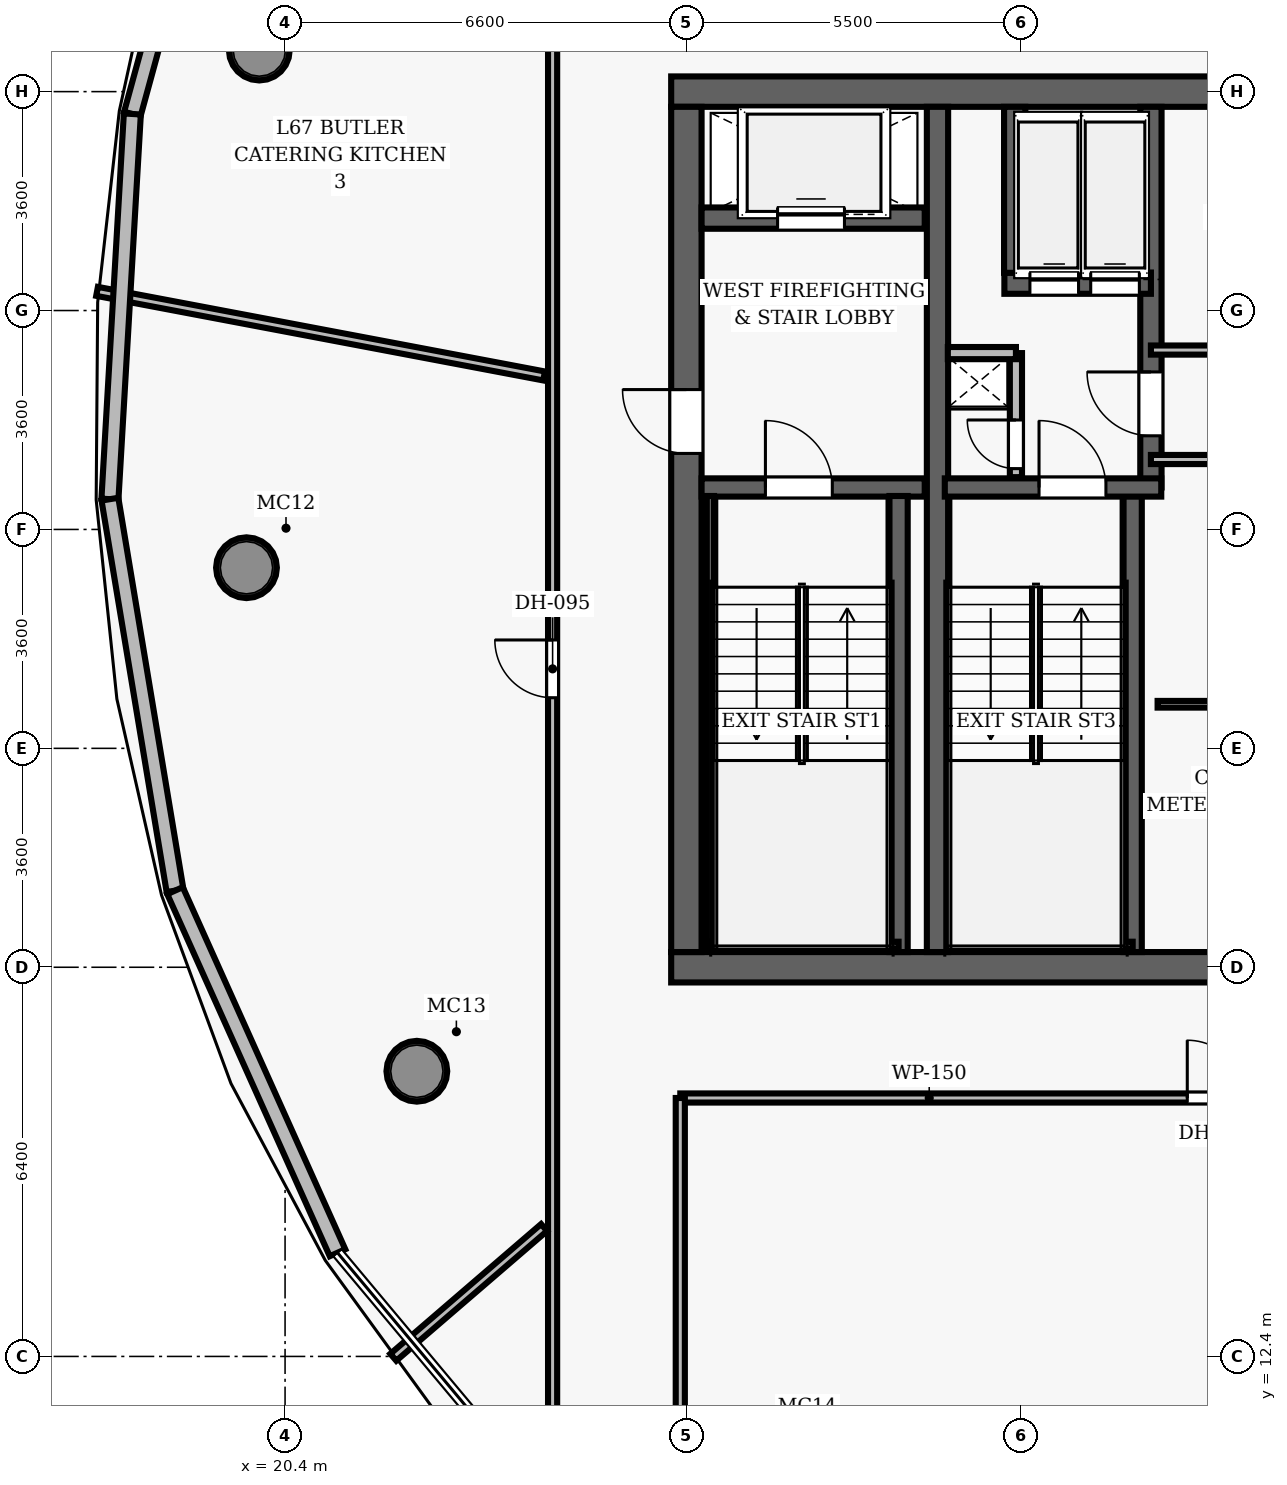
"""IFC4 building model, lengths in metres.
Left out: names, types, materials, properties, quantities, classifications, styles, units other than length and angle.
Written with IfcOpenShell. Run it as: python <this file> out.ifc"""

import sys

from ifc_helpers import new_model, si_unit, direction, frame, frame_2d, origin, origin_2d, place, context, subcontext, project, spatial, rectangle, hollow_circle, extrude, element, fill, save


model = new_model("IFC4")
c1 = context("Model", 3, precision=1e-05, world=origin(), true_north=direction((0.0, 1.0)))
c2 = subcontext(c1, "Body", "Model", "MODEL_VIEW")
j1 = project(units=[si_unit("LENGTHUNIT", "METRE"), si_unit("PLANEANGLEUNIT", "RADIAN")], contexts=[c1])
p1 = place(None, origin())
s1 = spatial("IfcSite", under=j1, at=p1, CompositionType="ELEMENT")
p2 = place(p1, origin())
s2 = spatial("IfcBuilding", under=s1, at=p2, CompositionType="ELEMENT")
p3 = place(p2, frame((0.0, 0.0, 265.15)))
s3 = spatial("IfcBuildingStorey", under=s2, at=p3, CompositionType="ELEMENT", Elevation=265.15)
p4 = place(p3, frame((26.75, 18.8, 0.0), z_axis=(0.0, 0.0, 1.0), x_axis=(1.0, 0.0, 0.0)))
e1 = element("IfcWall", 1, at=p4, inside=s3, PredefinedType="SHEAR", context=c2, shape_type="SweptSolid", body=[
    extrude(rectangle(XDim=22.5, YDim=0.5, at=frame_2d((11.25, 0.0))), origin(), (0.0, 0.0, 1.0), 3.85),
])
p5 = place(p4, frame((14.47, 0.0, 0.0)))
e2 = element("IfcOpeningElement", 2, at=p5, cuts=e1, PredefinedType="OPENING", context=c2, shape_type="SweptSolid", body=[
    extrude(rectangle(XDim=1.05, YDim=2.15, at=frame_2d((0.525, 1.075))), frame((0.0, 0.26, 0.0), z_axis=(0.0, -1.0, 0.0), x_axis=(1.0, 0.0, 0.0)), (0.0, 0.0, 1.0), 0.52),
])
p6 = place(p3, frame((26.75, 33.2, 0.0), z_axis=(0.0, 0.0, 1.0), x_axis=(1.0, 0.0, 0.0)))
e3 = element("IfcWall", 3, at=p6, inside=s3, PredefinedType="SHEAR", context=c2, shape_type="SweptSolid", body=[
    extrude(rectangle(XDim=22.5, YDim=0.5, at=frame_2d((11.25, 0.0))), origin(), (0.0, 0.0, 1.0), 3.85),
])
p7 = place(p3, frame((27.0, 19.05, 0.0), z_axis=(0.0, 0.0, 1.0), x_axis=(0.0, 1.0, 0.0)))
e4 = element("IfcWall", 4, at=p7, inside=s3, PredefinedType="SHEAR", context=c2, shape_type="SweptSolid", body=[
    extrude(rectangle(XDim=13.9, YDim=0.5, at=frame_2d((6.95, 0.0))), origin(), (0.0, 0.0, 1.0), 3.85),
])
p8 = place(p7, frame((8.2, 0.0, 0.0)))
e5 = element("IfcOpeningElement", 5, at=p8, cuts=e4, PredefinedType="OPENING", context=c2, shape_type="SweptSolid", body=[
    extrude(rectangle(XDim=1.05, YDim=2.15, at=frame_2d((0.525, 1.075))), frame((0.0, 0.26, 0.0), z_axis=(0.0, -1.0, 0.0), x_axis=(1.0, 0.0, 0.0)), (0.0, 0.0, 1.0), 0.52),
])
p9 = place(p3, frame((31.13, 19.05, 0.0), z_axis=(0.0, 0.0, 1.0), x_axis=(0.0, 1.0, 0.0)))
e6 = element("IfcWall", 6, at=p9, inside=s3, PredefinedType="SHEAR", context=c2, shape_type="SweptSolid", body=[
    extrude(rectangle(XDim=13.9, YDim=0.35, at=frame_2d((6.95, 0.0))), origin(), (0.0, 0.0, 1.0), 3.85),
])
for number, where, z_axis, x_axis in (
    (7, (19.976, 33.884, 0.0), (0.0, 0.0, 1.0), (1.0, 0.0, 0.0)),
    (8, (19.765, 25.371, 0.0), (0.0, 0.0, 1.0), (1.0, 0.0, 0.0)),
    (9, (22.567, 17.09, 0.0), (0.0, 0.0, 1.0), (1.0, 0.0, 0.0)),
):
    element("IfcColumn", number, at=place(p3, frame(where, z_axis=z_axis, x_axis=x_axis)), inside=s3, PredefinedType="COLUMN", context=c2, shape_type="SweptSolid", body=[
        extrude(hollow_circle(Radius=0.5, WallThickness=0.045, at=origin_2d()), origin(), (0.0, 0.0, 1.0), 3.85),
    ])
p10 = place(p3, frame((27.25, 26.69, 0.0), z_axis=(0.0, 0.0, 1.0), x_axis=(1.0, 0.0, 0.0)))
e10 = element("IfcWall", 10, at=p10, inside=s3, PredefinedType="SHEAR", context=c2, shape_type="SweptSolid", body=[
    extrude(rectangle(XDim=3.67, YDim=0.3, at=frame_2d((1.835, 0.0))), origin(), (0.0, 0.0, 1.0), 3.85),
])
p11 = place(p10, frame((1.05, 0.0, 0.0)))
e11 = element("IfcOpeningElement", 11, at=p11, cuts=e10, PredefinedType="OPENING", context=c2, shape_type="SweptSolid", body=[
    extrude(rectangle(XDim=1.1, YDim=2.15, at=frame_2d((0.55, 1.075))), frame((0.0, 0.16, 0.0), z_axis=(0.0, -1.0, 0.0), x_axis=(1.0, 0.0, 0.0)), (0.0, 0.0, 1.0), 0.32),
])
p12 = place(p3, frame((30.49, 19.05, 0.0), z_axis=(0.0, 0.0, 1.0), x_axis=(0.0, 1.0, 0.0)))
e12 = element("IfcWall", 12, at=p12, inside=s3, PredefinedType="SHEAR", context=c2, shape_type="SweptSolid", body=[
    extrude(rectangle(XDim=7.5, YDim=0.3, at=frame_2d((3.75, 0.0))), origin(), (0.0, 0.0, 1.0), 3.85),
])
p13 = place(p3, frame((27.395, 19.1, 0.0), z_axis=(0.0, 0.0, 1.0), x_axis=(0.0, 1.0, 0.0)))
e13 = element("IfcWall", 13, at=p13, inside=s3, PredefinedType="SHEAR", context=c2, shape_type="SweptSolid", body=[
    extrude(rectangle(XDim=7.45, YDim=0.12, at=frame_2d((3.725, 0.0))), origin(), (0.0, 0.0, 1.0), 3.85),
])
p14 = place(p3, frame((27.395, 19.16, 0.0), z_axis=(0.0, 0.0, 1.0), x_axis=(1.0, 0.0, 0.0)))
e14 = element("IfcWall", 14, at=p14, inside=s3, PredefinedType="SHEAR", context=c2, shape_type="SweptSolid", body=[
    extrude(rectangle(XDim=3.095, YDim=0.12, at=frame_2d((1.547, 0.0))), origin(), (0.0, 0.0, 1.0), 3.85),
])
p15 = place(p3, frame((27.25, 31.12, 0.0), z_axis=(0.0, 0.0, 1.0), x_axis=(1.0, 0.0, 0.0)))
e15 = element("IfcWall", 15, at=p15, inside=s3, PredefinedType="SHEAR", context=c2, shape_type="SweptSolid", body=[
    extrude(rectangle(XDim=3.67, YDim=0.35, at=frame_2d((1.835, 0.0))), origin(), (0.0, 0.0, 1.0), 3.04),
])
p16 = place(p15, frame((1.25, 0.0, 0.0)))
e16 = element("IfcOpeningElement", 16, at=p16, cuts=e15, PredefinedType="OPENING", context=c2, shape_type="SweptSolid", body=[
    extrude(rectangle(XDim=1.1, YDim=2.15, at=frame_2d((0.55, 1.075))), frame((0.0, 0.185, 0.0), z_axis=(0.0, -1.0, 0.0), x_axis=(1.0, 0.0, 0.0)), (0.0, 0.0, 1.0), 0.37),
])
p17 = place(p3, frame((34.34, 19.05, 0.0), z_axis=(0.0, 0.0, 1.0), x_axis=(0.0, 1.0, 0.0)))
e17 = element("IfcWall", 17, at=p17, inside=s3, PredefinedType="SHEAR", context=c2, shape_type="SweptSolid", body=[
    extrude(rectangle(XDim=7.5, YDim=0.3, at=frame_2d((3.75, 0.0))), origin(), (0.0, 0.0, 1.0), 3.85),
])
p18 = place(p3, frame((34.64, 26.69, 0.0), z_axis=(0.0, 0.0, 1.0), x_axis=(0.0, 1.0, 0.0)))
e18 = element("IfcWall", 18, at=p18, inside=s3, PredefinedType="SHEAR", context=c2, shape_type="SweptSolid", body=[
    extrude(rectangle(XDim=6.26, YDim=0.35, at=frame_2d((3.13, 0.0))), origin(), (0.0, 0.0, 1.0), 3.85),
])
p19 = place(p18, frame((0.85, 0.0, 0.0)))
e19 = element("IfcOpeningElement", 19, at=p19, cuts=e18, PredefinedType="OPENING", context=c2, shape_type="SweptSolid", body=[
    extrude(rectangle(XDim=1.05, YDim=2.15, at=frame_2d((0.525, 1.075))), frame((0.0, 0.185, 0.0), z_axis=(0.0, -1.0, 0.0), x_axis=(1.0, 0.0, 0.0)), (0.0, 0.0, 1.0), 0.37),
])
p20 = place(p3, frame((31.25, 26.69, 0.0), z_axis=(0.0, 0.0, 1.0), x_axis=(1.0, 0.0, 0.0)))
e20 = element("IfcWall", 20, at=p20, inside=s3, PredefinedType="SHEAR", context=c2, shape_type="SweptSolid", body=[
    extrude(rectangle(XDim=3.56, YDim=0.3, at=frame_2d((1.78, 0.0))), origin(), (0.0, 0.0, 1.0), 3.85),
])
p21 = place(p20, frame((1.55, 0.0, 0.0)))
e21 = element("IfcOpeningElement", 21, at=p21, cuts=e20, PredefinedType="OPENING", context=c2, shape_type="SweptSolid", body=[
    extrude(rectangle(XDim=1.1, YDim=2.15, at=frame_2d((0.55, 1.075))), frame((0.0, 0.16, 0.0), z_axis=(0.0, -1.0, 0.0), x_axis=(1.0, 0.0, 0.0)), (0.0, 0.0, 1.0), 0.32),
])
p22 = place(p3, frame((31.3, 19.16, 0.0), z_axis=(0.0, 0.0, 1.0), x_axis=(1.0, 0.0, 0.0)))
e22 = element("IfcWall", 22, at=p22, inside=s3, PredefinedType="SHEAR", context=c2, shape_type="SweptSolid", body=[
    extrude(rectangle(XDim=3.04, YDim=0.12, at=frame_2d((1.52, 0.0))), origin(), (0.0, 0.0, 1.0), 3.85),
])
p23 = place(p3, frame((32.23, 30.05, 0.0), z_axis=(0.0, 0.0, 1.0), x_axis=(1.0, 0.0, 0.0)))
e23 = element("IfcWall", 23, at=p23, inside=s3, PredefinedType="SHEAR", context=c2, shape_type="SweptSolid", body=[
    extrude(rectangle(XDim=2.41, YDim=0.35, at=frame_2d((1.205, 0.0))), origin(), (0.0, 0.0, 1.0), 3.04),
])
p24 = place(p23, frame((0.42, 0.0, 0.0)))
e24 = element("IfcOpeningElement", 24, at=p24, cuts=e23, PredefinedType="OPENING", context=c2, shape_type="SweptSolid", body=[
    extrude(rectangle(XDim=0.8, YDim=2.15, at=frame_2d((0.4, 1.075))), frame((0.0, 0.185, 0.0), z_axis=(0.0, -1.0, 0.0), x_axis=(1.0, 0.0, 0.0)), (0.0, 0.0, 1.0), 0.37),
])
p25 = place(p23, frame((1.42, 0.0, 0.0)))
e25 = element("IfcOpeningElement", 25, at=p25, cuts=e23, PredefinedType="OPENING", context=c2, shape_type="SweptSolid", body=[
    extrude(rectangle(XDim=0.8, YDim=2.15, at=frame_2d((0.4, 1.075))), frame((0.0, 0.185, 0.0), z_axis=(0.0, -1.0, 0.0), x_axis=(1.0, 0.0, 0.0)), (0.0, 0.0, 1.0), 0.37),
])
p26 = place(p3, frame((32.4, 30.22, 0.0), z_axis=(0.0, 0.0, 1.0), x_axis=(0.0, 1.0, 0.0)))
e26 = element("IfcWall", 26, at=p26, inside=s3, PredefinedType="SHEAR", context=c2, shape_type="SweptSolid", body=[
    extrude(rectangle(XDim=2.73, YDim=0.35, at=frame_2d((1.365, 0.0))), origin(), (0.0, 0.0, 1.0), 3.04),
])
p27 = place(p3, frame((32.42, 26.86, 0.0), z_axis=(0.0, 0.0, 1.0), x_axis=(0.0, 1.0, 0.0)))
e27 = element("IfcWall", 27, at=p27, inside=s3, PredefinedType="PARTITIONING", context=c2, shape_type="SweptSolid", body=[
    extrude(rectangle(XDim=2.04, YDim=0.2, at=frame_2d((1.02, 0.0))), origin(), (0.0, 0.0, 1.0), 3.04),
])
p28 = place(p27, frame((0.14, 0.0, 0.0)))
e28 = element("IfcOpeningElement", 28, at=p28, cuts=e27, PredefinedType="OPENING", context=c2, shape_type="SweptSolid", body=[
    extrude(rectangle(XDim=0.8, YDim=2.05, at=frame_2d((0.4, 1.025))), frame((0.0, 0.11, 0.0), z_axis=(0.0, -1.0, 0.0), x_axis=(1.0, 0.0, 0.0)), (0.0, 0.0, 1.0), 0.22),
])
p29 = place(p3, frame((31.3, 28.9, 0.0), z_axis=(0.0, 0.0, 1.0), x_axis=(1.0, 0.0, 0.0)))
e29 = element("IfcWall", 29, at=p29, inside=s3, PredefinedType="PARTITIONING", context=c2, shape_type="SweptSolid", body=[
    extrude(rectangle(XDim=1.12, YDim=0.2, at=frame_2d((0.56, 0.0))), origin(), (0.0, 0.0, 1.0), 3.04),
])
for number, where, z_axis, x_axis in (
    (30, (34.64, 27.15, 0.0), (0.0, 0.0, 1.0), (1.0, 0.0, 0.0)),
    (31, (34.64, 28.95, 0.0), (0.0, 0.0, 1.0), (1.0, 0.0, 0.0)),
):
    element("IfcWall", number, at=place(p3, frame(where, z_axis=z_axis, x_axis=x_axis)), inside=s3, PredefinedType="PARTITIONING", context=c2, shape_type="SweptSolid", body=[
        extrude(rectangle(XDim=6.36, YDim=0.15, at=frame_2d((3.18, 0.0))), origin(), (0.0, 0.0, 1.0), 3.04),
    ])
p30 = place(p3, frame((34.75, 23.125, 0.0), z_axis=(0.0, 0.0, 1.0), x_axis=(1.0, 0.0, 0.0)))
e32 = element("IfcWall", 32, at=p30, inside=s3, PredefinedType="PARTITIONING", context=c2, shape_type="SweptSolid", body=[
    extrude(rectangle(XDim=6.25, YDim=0.11, at=frame_2d((3.125, 0.0))), origin(), (0.0, 0.0, 1.0), 3.04),
])
p31 = place(p3, frame((26.9, 16.65, 0.0), z_axis=(0.0, 0.0, 1.0), x_axis=(1.0, 0.0, 0.0)))
e33 = element("IfcWall", 33, at=p31, inside=s3, PredefinedType="PARTITIONING", context=c2, shape_type="SweptSolid", body=[
    extrude(rectangle(XDim=22.2, YDim=0.15, at=frame_2d((11.1, 0.0))), origin(), (0.0, 0.0, 1.0), 3.04),
])
p32 = place(p31, frame((8.338, 0.0, 0.0)))
e34 = element("IfcOpeningElement", 34, at=p32, cuts=e33, PredefinedType="OPENING", context=c2, shape_type="SweptSolid", body=[
    extrude(rectangle(XDim=0.95, YDim=2.15, at=frame_2d((0.475, 1.075))), frame((0.0, 0.085, 0.0), z_axis=(0.0, -1.0, 0.0), x_axis=(1.0, 0.0, 0.0)), (0.0, 0.0, 1.0), 0.17),
])
p33 = place(p31, frame((15.929, 0.0, 0.0)))
e35 = element("IfcOpeningElement", 35, at=p33, cuts=e33, PredefinedType="OPENING", context=c2, shape_type="SweptSolid", body=[
    extrude(rectangle(XDim=1.5, YDim=2.2, at=frame_2d((0.75, 1.1))), frame((0.0, 0.085, 0.0), z_axis=(0.0, -1.0, 0.0), x_axis=(1.0, 0.0, 0.0)), (0.0, 0.0, 1.0), 0.17),
])
p34 = place(p3, frame((24.8, 10.6, 0.0), z_axis=(0.0, 0.0, 1.0), x_axis=(0.0, 1.0, 0.0)))
e36 = element("IfcWall", 36, at=p34, inside=s3, PredefinedType="PARTITIONING", context=c2, shape_type="SweptSolid", body=[
    extrude(rectangle(XDim=30.8, YDim=0.15, at=frame_2d((15.4, 0.0))), origin(), (0.0, 0.0, 1.0), 3.04),
])
p35 = place(p34, frame((12.632, 0.0, 0.0)))
e37 = element("IfcOpeningElement", 37, at=p35, cuts=e36, PredefinedType="OPENING", context=c2, shape_type="SweptSolid", body=[
    extrude(rectangle(XDim=0.95, YDim=2.15, at=frame_2d((0.475, 1.075))), frame((0.0, 0.085, 0.0), z_axis=(0.0, -1.0, 0.0), x_axis=(1.0, 0.0, 0.0)), (0.0, 0.0, 1.0), 0.17),
])
p36 = place(p3, frame((26.9, 10.6, 0.0), z_axis=(0.0, 0.0, 1.0), x_axis=(0.0, 1.0, 0.0)))
e38 = element("IfcWall", 38, at=p36, inside=s3, PredefinedType="PARTITIONING", context=c2, shape_type="SweptSolid", body=[
    extrude(rectangle(XDim=6.05, YDim=0.15, at=frame_2d((3.025, 0.0))), origin(), (0.0, 0.0, 1.0), 3.04),
])
p37 = place(p3, frame((24.66, 28.524, 0.0), z_axis=(0.0, 0.0, 1.0), x_axis=(-0.982565735445, 0.185915506428, 0.0)))
e39 = element("IfcWall", 39, at=p37, inside=s3, PredefinedType="PARTITIONING", context=c2, shape_type="SweptSolid", body=[
    extrude(rectangle(XDim=7.482, YDim=0.15, at=frame_2d((3.741, 0.0))), origin(), (0.0, 0.0, 1.0), 3.04),
])
p38 = place(p3, frame((24.66, 14.52, 0.0), z_axis=(0.0, 0.0, 1.0), x_axis=(-0.757932783807, -0.652332656879, 0.0)))
e40 = element("IfcWall", 40, at=p38, inside=s3, PredefinedType="PARTITIONING", context=c2, shape_type="SweptSolid", body=[
    extrude(rectangle(XDim=3.271, YDim=0.15, at=frame_2d((1.636, 0.0))), origin(), (0.0, 0.0, 1.0), 3.04),
])
p39 = place(p3, frame((17.888, 32.832, 0.0), z_axis=(0.0, 0.0, 1.0), x_axis=(0.26396334097, 0.964532713092, 0.0)))
e41 = element("IfcWall", 41, at=p39, inside=s3, PredefinedType="SOLIDWALL", context=c2, shape_type="SweptSolid", body=[
    extrude(rectangle(XDim=5.86, YDim=0.28, at=frame_2d((2.93, 0.0))), origin(), (0.0, 0.0, 1.0), 3.625),
])
p40 = place(p3, frame((17.52, 26.498, 0.0), z_axis=(0.0, 0.0, 1.0), x_axis=(0.058061140862, 0.998313029025, 0.0)))
e42 = element("IfcWall", 42, at=p40, inside=s3, PredefinedType="SOLIDWALL", context=c2, shape_type="SweptSolid", body=[
    extrude(rectangle(XDim=6.345, YDim=0.28, at=frame_2d((3.173, 0.0))), origin(), (0.0, 0.0, 1.0), 3.625),
])
p41 = place(p3, frame((18.59, 20.06, 0.0), z_axis=(0.0, 0.0, 1.0), x_axis=(-0.164041057691, 0.986453512028, 0.0)))
e43 = element("IfcWall", 43, at=p41, inside=s3, PredefinedType="SOLIDWALL", context=c2, shape_type="SweptSolid", body=[
    extrude(rectangle(XDim=6.526, YDim=0.28, at=frame_2d((3.263, 0.0))), origin(), (0.0, 0.0, 1.0), 3.625),
])
p42 = place(p3, frame((21.263, 14.105, 0.0), z_axis=(0.0, 0.0, 1.0), x_axis=(-0.409432842819, 0.912340258468, 0.0)))
e44 = element("IfcWall", 44, at=p42, inside=s3, PredefinedType="SOLIDWALL", context=c2, shape_type="SweptSolid", body=[
    extrude(rectangle(XDim=6.527, YDim=0.28, at=frame_2d((3.264, 0.0))), origin(), (0.0, 0.0, 1.0), 3.625),
])
p43 = place(p11, origin())
e45 = element("IfcDoor", 45, at=p43, inside=s3, OperationType="SINGLE_SWING_LEFT", PredefinedType="DOOR", context=c2, shape_type="SweptSolid", body=[
    extrude(rectangle(XDim=1.1, YDim=2.15, at=frame_2d((0.55, 1.075))), frame((0.0, 0.025, 0.0), z_axis=(0.0, -1.0, 0.0), x_axis=(1.0, 0.0, 0.0)), (0.0, 0.0, 1.0), 0.05),
])
fill(e11, e45)
p44 = place(p8, origin())
e46 = element("IfcDoor", 46, at=p44, inside=s3, OperationType="SINGLE_SWING_RIGHT", PredefinedType="DOOR", context=c2, shape_type="SweptSolid", body=[
    extrude(rectangle(XDim=1.05, YDim=2.15, at=frame_2d((0.525, 1.075))), frame((0.0, 0.025, 0.0), z_axis=(0.0, -1.0, 0.0), x_axis=(1.0, 0.0, 0.0)), (0.0, 0.0, 1.0), 0.05),
])
fill(e5, e46)
p45 = place(p21, origin())
e47 = element("IfcDoor", 47, at=p45, inside=s3, OperationType="SINGLE_SWING_LEFT", PredefinedType="DOOR", context=c2, shape_type="SweptSolid", body=[
    extrude(rectangle(XDim=1.1, YDim=2.15, at=frame_2d((0.55, 1.075))), frame((0.0, 0.025, 0.0), z_axis=(0.0, -1.0, 0.0), x_axis=(1.0, 0.0, 0.0)), (0.0, 0.0, 1.0), 0.05),
])
fill(e21, e47)
p46 = place(p28, origin())
e48 = element("IfcDoor", 48, at=p46, inside=s3, OperationType="SINGLE_SWING_RIGHT", PredefinedType="DOOR", context=c2, shape_type="SweptSolid", body=[
    extrude(rectangle(XDim=0.8, YDim=2.05, at=frame_2d((0.4, 1.025))), frame((0.0, 0.025, 0.0), z_axis=(0.0, -1.0, 0.0), x_axis=(1.0, 0.0, 0.0)), (0.0, 0.0, 1.0), 0.05),
])
fill(e28, e48)
p47 = place(p19, origin())
e49 = element("IfcDoor", 49, at=p47, inside=s3, OperationType="SINGLE_SWING_RIGHT", PredefinedType="DOOR", context=c2, shape_type="SweptSolid", body=[
    extrude(rectangle(XDim=1.05, YDim=2.15, at=frame_2d((0.525, 1.075))), frame((0.0, 0.025, 0.0), z_axis=(0.0, -1.0, 0.0), x_axis=(1.0, 0.0, 0.0)), (0.0, 0.0, 1.0), 0.05),
])
fill(e19, e49)
p48 = place(p35, origin())
e50 = element("IfcDoor", 50, at=p48, inside=s3, OperationType="SINGLE_SWING_RIGHT", PredefinedType="DOOR", context=c2, shape_type="SweptSolid", body=[
    extrude(rectangle(XDim=0.95, YDim=2.15, at=frame_2d((0.475, 1.075))), frame((0.0, 0.025, 0.0), z_axis=(0.0, -1.0, 0.0), x_axis=(1.0, 0.0, 0.0)), (0.0, 0.0, 1.0), 0.05),
])
fill(e37, e50)
p49 = place(p32, origin())
e51 = element("IfcDoor", 51, at=p49, inside=s3, OperationType="SINGLE_SWING_LEFT", PredefinedType="DOOR", context=c2, shape_type="SweptSolid", body=[
    extrude(rectangle(XDim=0.95, YDim=2.15, at=frame_2d((0.475, 1.075))), frame((0.0, 0.025, 0.0), z_axis=(0.0, -1.0, 0.0), x_axis=(1.0, 0.0, 0.0)), (0.0, 0.0, 1.0), 0.05),
])
fill(e34, e51)
p50 = place(p16, origin())
e52 = element("IfcDoor", 52, at=p50, inside=s3, OperationType="SLIDING_TO_LEFT", PredefinedType="DOOR", context=c2, shape_type="SweptSolid", body=[
    extrude(rectangle(XDim=1.1, YDim=2.15, at=frame_2d((0.55, 1.075))), frame((0.0, 0.025, 0.0), z_axis=(0.0, -1.0, 0.0), x_axis=(1.0, 0.0, 0.0)), (0.0, 0.0, 1.0), 0.05),
])
fill(e16, e52)
p51 = place(p24, origin())
e53 = element("IfcDoor", 53, at=p51, inside=s3, OperationType="SLIDING_TO_LEFT", PredefinedType="DOOR", context=c2, shape_type="SweptSolid", body=[
    extrude(rectangle(XDim=0.8, YDim=2.15, at=frame_2d((0.4, 1.075))), frame((0.0, 0.025, 0.0), z_axis=(0.0, -1.0, 0.0), x_axis=(1.0, 0.0, 0.0)), (0.0, 0.0, 1.0), 0.05),
])
fill(e24, e53)
p52 = place(p25, origin())
e54 = element("IfcDoor", 54, at=p52, inside=s3, OperationType="SLIDING_TO_LEFT", PredefinedType="DOOR", context=c2, shape_type="SweptSolid", body=[
    extrude(rectangle(XDim=0.8, YDim=2.15, at=frame_2d((0.4, 1.075))), frame((0.0, 0.025, 0.0), z_axis=(0.0, -1.0, 0.0), x_axis=(1.0, 0.0, 0.0)), (0.0, 0.0, 1.0), 0.05),
])
fill(e25, e54)
save(model, sys.argv[1])
